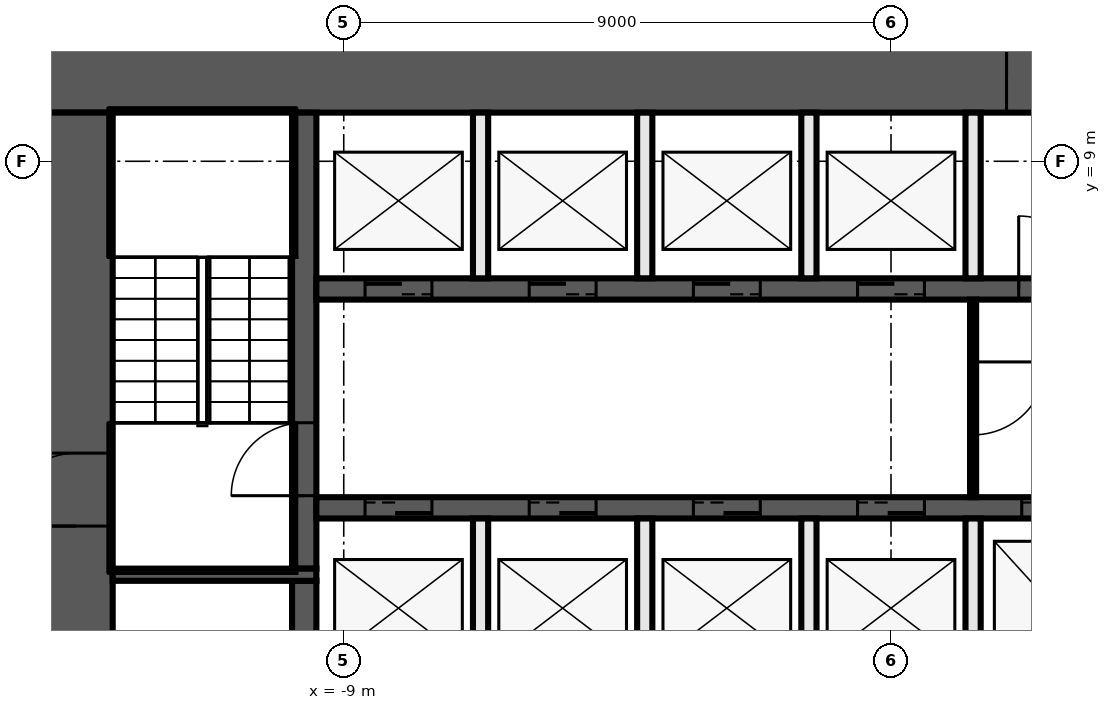
"""IFC4 building model, lengths in metres.
Left out: names, types, materials, properties, quantities, classifications, styles, units other than length and angle.
Written with IfcOpenShell. Run it as: python <this file> out.ifc"""

import sys

from ifc_helpers import new_model, si_unit, direction, frame, frame_2d, origin, place, context, subcontext, project, spatial, rectangle, extrude, element, fill, save


model = new_model("IFC4")
c1 = context("Model", 3, precision=1e-05, world=origin(), true_north=direction((0.0, 1.0)))
c2 = subcontext(c1, "Body", "Model", "MODEL_VIEW")
j1 = project(units=[si_unit("LENGTHUNIT", "METRE"), si_unit("PLANEANGLEUNIT", "RADIAN")], contexts=[c1])
p1 = place(None, origin())
s1 = spatial("IfcSite", under=j1, at=p1, CompositionType="ELEMENT")
p2 = place(p1, origin())
s2 = spatial("IfcBuilding", under=s1, at=p2, CompositionType="ELEMENT")
p3 = place(p2, origin())
s3 = spatial("IfcBuildingStorey", under=s2, at=p3, CompositionType="ELEMENT", Elevation=0.0)
p4 = place(p3, frame((-14.0, 10.4, 0.0), z_axis=(0.0, 0.0, 1.0), x_axis=(1.0, 0.0, 0.0)))
e1 = element("IfcWall", 1, at=p4, inside=s3, PredefinedType="SHEAR", context=c2, shape_type="SweptSolid", body=[
    extrude(rectangle(XDim=28.0, YDim=1.2, at=frame_2d((14.0, 0.0))), origin(), (0.0, 0.0, 1.0), 8.55),
])
p5 = place(p4, frame((15.9, 0.0, 0.0)))
e2 = element("IfcOpeningElement", 2, at=p5, cuts=e1, PredefinedType="OPENING", context=c2, shape_type="SweptSolid", body=[
    extrude(rectangle(XDim=1.6, YDim=2.1, at=frame_2d((0.8, 1.05))), frame((0.0, 0.61, 0.0), z_axis=(0.0, -1.0, 0.0), x_axis=(1.0, 0.0, 0.0)), (0.0, 0.0, 1.0), 1.22),
])
p6 = place(p3, frame((-13.4, -9.8, 0.0), z_axis=(0.0, 0.0, 1.0), x_axis=(0.0, 1.0, 0.0)))
e3 = element("IfcWall", 3, at=p6, inside=s3, PredefinedType="SHEAR", context=c2, shape_type="SweptSolid", body=[
    extrude(rectangle(XDim=19.6, YDim=1.2, at=frame_2d((9.8, 0.0))), origin(), (0.0, 0.0, 1.0), 8.55),
])
p7 = place(p6, frame((12.8, 0.0, 0.0)))
e4 = element("IfcOpeningElement", 4, at=p7, cuts=e3, PredefinedType="OPENING", context=c2, shape_type="SweptSolid", body=[
    extrude(rectangle(XDim=1.2, YDim=2.1, at=frame_2d((0.6, 1.05))), frame((0.0, 0.61, 0.0), z_axis=(0.0, -1.0, 0.0), x_axis=(1.0, 0.0, 0.0)), (0.0, 0.0, 1.0), 1.22),
])
p8 = place(p6, frame((5.6, 0.0, 0.0)))
e5 = element("IfcOpeningElement", 5, at=p8, cuts=e3, PredefinedType="OPENING", context=c2, shape_type="SweptSolid", body=[
    extrude(rectangle(XDim=1.2, YDim=2.1, at=frame_2d((0.6, 1.05))), frame((0.0, 0.61, 0.0), z_axis=(0.0, -1.0, 0.0), x_axis=(1.0, 0.0, 0.0)), (0.0, 0.0, 1.0), 1.22),
])
p9 = place(p3, frame((-9.65, -2.1, 0.0), z_axis=(0.0, 0.0, 1.0), x_axis=(0.0, 1.0, 0.0)))
e6 = element("IfcWall", 6, at=p9, inside=s3, PredefinedType="SHEAR", context=c2, shape_type="SweptSolid", body=[
    extrude(rectangle(XDim=4.2, YDim=0.4, at=frame_2d((2.1, 0.0))), origin(), (0.0, 0.0, 1.0), 8.55),
])
p10 = place(p3, frame((-9.65, 2.3, 0.0), z_axis=(0.0, 0.0, 1.0), x_axis=(0.0, 1.0, 0.0)))
e7 = element("IfcWall", 7, at=p10, inside=s3, PredefinedType="SHEAR", context=c2, shape_type="SweptSolid", body=[
    extrude(rectangle(XDim=7.5, YDim=0.4, at=frame_2d((3.75, 0.0))), origin(), (0.0, 0.0, 1.0), 8.55),
])
p11 = place(p10, frame((1.2, 0.0, 0.0)))
e8 = element("IfcOpeningElement", 8, at=p11, cuts=e7, PredefinedType="OPENING", context=c2, shape_type="SweptSolid", body=[
    extrude(rectangle(XDim=1.2, YDim=2.1, at=frame_2d((0.6, 1.05))), frame((0.0, 0.21, 0.0), z_axis=(0.0, -1.0, 0.0), x_axis=(1.0, 0.0, 0.0)), (0.0, 0.0, 1.0), 0.42),
])
p12 = place(p3, frame((-9.45, 2.2, 0.0), z_axis=(0.0, 0.0, 1.0), x_axis=(-1.0, 0.0, 0.0)))
e9 = element("IfcWall", 9, at=p12, inside=s3, PredefinedType="SHEAR", context=c2, shape_type="SweptSolid", body=[
    extrude(rectangle(XDim=3.35, YDim=0.2, at=frame_2d((1.675, 0.0))), origin(), (0.0, 0.0, 1.0), 8.55),
])
p13 = place(p3, frame((-9.45, 6.9, 0.0), z_axis=(0.0, 0.0, 1.0), x_axis=(1.0, 0.0, 0.0)))
e10 = element("IfcWall", 10, at=p13, inside=s3, PredefinedType="SHEAR", context=c2, shape_type="SweptSolid", body=[
    extrude(rectangle(XDim=18.9, YDim=0.35, at=frame_2d((9.45, 0.0))), origin(), (0.0, 0.0, 1.0), 8.55),
])
p14 = place(p13, frame((0.8, 0.0, 0.0)))
e11 = element("IfcOpeningElement", 11, at=p14, cuts=e10, PredefinedType="OPENING", context=c2, shape_type="SweptSolid", body=[
    extrude(rectangle(XDim=1.1, YDim=2.1, at=frame_2d((0.55, 1.05))), frame((0.0, 0.185, 0.0), z_axis=(0.0, -1.0, 0.0), x_axis=(1.0, 0.0, 0.0)), (0.0, 0.0, 1.0), 0.37),
])
p15 = place(p13, frame((3.5, 0.0, 0.0)))
e12 = element("IfcOpeningElement", 12, at=p15, cuts=e10, PredefinedType="OPENING", context=c2, shape_type="SweptSolid", body=[
    extrude(rectangle(XDim=1.1, YDim=2.1, at=frame_2d((0.55, 1.05))), frame((0.0, 0.185, 0.0), z_axis=(0.0, -1.0, 0.0), x_axis=(1.0, 0.0, 0.0)), (0.0, 0.0, 1.0), 0.37),
])
p16 = place(p13, frame((6.2, 0.0, 0.0)))
e13 = element("IfcOpeningElement", 13, at=p16, cuts=e10, PredefinedType="OPENING", context=c2, shape_type="SweptSolid", body=[
    extrude(rectangle(XDim=1.1, YDim=2.1, at=frame_2d((0.55, 1.05))), frame((0.0, 0.185, 0.0), z_axis=(0.0, -1.0, 0.0), x_axis=(1.0, 0.0, 0.0)), (0.0, 0.0, 1.0), 0.37),
])
p17 = place(p13, frame((8.9, 0.0, 0.0)))
e14 = element("IfcOpeningElement", 14, at=p17, cuts=e10, PredefinedType="OPENING", context=c2, shape_type="SweptSolid", body=[
    extrude(rectangle(XDim=1.1, YDim=2.1, at=frame_2d((0.55, 1.05))), frame((0.0, 0.185, 0.0), z_axis=(0.0, -1.0, 0.0), x_axis=(1.0, 0.0, 0.0)), (0.0, 0.0, 1.0), 0.37),
])
p18 = place(p13, frame((11.55, 0.0, 0.0)))
e15 = element("IfcOpeningElement", 15, at=p18, cuts=e10, PredefinedType="OPENING", context=c2, shape_type="SweptSolid", body=[
    extrude(rectangle(XDim=1.2, YDim=2.1, at=frame_2d((0.6, 1.05))), frame((0.0, 0.185, 0.0), z_axis=(0.0, -1.0, 0.0), x_axis=(1.0, 0.0, 0.0)), (0.0, 0.0, 1.0), 0.37),
])
p19 = place(p13, frame((14.3, 0.0, 0.0)))
e16 = element("IfcOpeningElement", 16, at=p19, cuts=e10, PredefinedType="OPENING", context=c2, shape_type="SweptSolid", body=[
    extrude(rectangle(XDim=1.1, YDim=2.1, at=frame_2d((0.55, 1.05))), frame((0.0, 0.185, 0.0), z_axis=(0.0, -1.0, 0.0), x_axis=(1.0, 0.0, 0.0)), (0.0, 0.0, 1.0), 0.37),
])
p20 = place(p13, frame((17.0, 0.0, 0.0)))
e17 = element("IfcOpeningElement", 17, at=p20, cuts=e10, PredefinedType="OPENING", context=c2, shape_type="SweptSolid", body=[
    extrude(rectangle(XDim=1.1, YDim=2.1, at=frame_2d((0.55, 1.05))), frame((0.0, 0.185, 0.0), z_axis=(0.0, -1.0, 0.0), x_axis=(1.0, 0.0, 0.0)), (0.0, 0.0, 1.0), 0.37),
])
p21 = place(p3, frame((9.45, 3.3, 0.0), z_axis=(0.0, 0.0, 1.0), x_axis=(-1.0, 0.0, 0.0)))
e18 = element("IfcWall", 18, at=p21, inside=s3, PredefinedType="SHEAR", context=c2, shape_type="SweptSolid", body=[
    extrude(rectangle(XDim=18.9, YDim=0.35, at=frame_2d((9.45, 0.0))), origin(), (0.0, 0.0, 1.0), 8.55),
])
p22 = place(p21, frame((0.9, 0.0, 0.0)))
e19 = element("IfcOpeningElement", 19, at=p22, cuts=e18, PredefinedType="OPENING", context=c2, shape_type="SweptSolid", body=[
    extrude(rectangle(XDim=0.9, YDim=2.1, at=frame_2d((0.45, 1.05))), frame((0.0, 0.185, 0.0), z_axis=(0.0, -1.0, 0.0), x_axis=(1.0, 0.0, 0.0)), (0.0, 0.0, 1.0), 0.37),
])
p23 = place(p21, frame((17.0, 0.0, 0.0)))
e20 = element("IfcOpeningElement", 20, at=p23, cuts=e18, PredefinedType="OPENING", context=c2, shape_type="SweptSolid", body=[
    extrude(rectangle(XDim=1.1, YDim=2.1, at=frame_2d((0.55, 1.05))), frame((0.0, 0.185, 0.0), z_axis=(0.0, -1.0, 0.0), x_axis=(1.0, 0.0, 0.0)), (0.0, 0.0, 1.0), 0.37),
])
p24 = place(p21, frame((14.3, 0.0, 0.0)))
e21 = element("IfcOpeningElement", 21, at=p24, cuts=e18, PredefinedType="OPENING", context=c2, shape_type="SweptSolid", body=[
    extrude(rectangle(XDim=1.1, YDim=2.1, at=frame_2d((0.55, 1.05))), frame((0.0, 0.185, 0.0), z_axis=(0.0, -1.0, 0.0), x_axis=(1.0, 0.0, 0.0)), (0.0, 0.0, 1.0), 0.37),
])
p25 = place(p21, frame((11.6, 0.0, 0.0)))
e22 = element("IfcOpeningElement", 22, at=p25, cuts=e18, PredefinedType="OPENING", context=c2, shape_type="SweptSolid", body=[
    extrude(rectangle(XDim=1.1, YDim=2.1, at=frame_2d((0.55, 1.05))), frame((0.0, 0.185, 0.0), z_axis=(0.0, -1.0, 0.0), x_axis=(1.0, 0.0, 0.0)), (0.0, 0.0, 1.0), 0.37),
])
p26 = place(p21, frame((8.9, 0.0, 0.0)))
e23 = element("IfcOpeningElement", 23, at=p26, cuts=e18, PredefinedType="OPENING", context=c2, shape_type="SweptSolid", body=[
    extrude(rectangle(XDim=1.1, YDim=2.1, at=frame_2d((0.55, 1.05))), frame((0.0, 0.185, 0.0), z_axis=(0.0, -1.0, 0.0), x_axis=(1.0, 0.0, 0.0)), (0.0, 0.0, 1.0), 0.37),
])
p27 = place(p21, frame((6.2, 0.0, 0.0)))
e24 = element("IfcOpeningElement", 24, at=p27, cuts=e18, PredefinedType="OPENING", context=c2, shape_type="SweptSolid", body=[
    extrude(rectangle(XDim=1.1, YDim=2.1, at=frame_2d((0.55, 1.05))), frame((0.0, 0.185, 0.0), z_axis=(0.0, -1.0, 0.0), x_axis=(1.0, 0.0, 0.0)), (0.0, 0.0, 1.0), 0.37),
])
p28 = place(p21, frame((3.5, 0.0, 0.0)))
e25 = element("IfcOpeningElement", 25, at=p28, cuts=e18, PredefinedType="OPENING", context=c2, shape_type="SweptSolid", body=[
    extrude(rectangle(XDim=1.1, YDim=2.1, at=frame_2d((0.55, 1.05))), frame((0.0, 0.185, 0.0), z_axis=(0.0, -1.0, 0.0), x_axis=(1.0, 0.0, 0.0)), (0.0, 0.0, 1.0), 0.37),
])
p29 = place(p3, frame((1.35, 6.725, 0.0), z_axis=(0.0, 0.0, 1.0), x_axis=(0.0, -1.0, 0.0)))
e26 = element("IfcWall", 26, at=p29, inside=s3, PredefinedType="PARTITIONING", context=c2, shape_type="SweptSolid", body=[
    extrude(rectangle(XDim=3.25, YDim=0.1, at=frame_2d((1.625, 0.0))), origin(), (0.0, 0.0, 1.0), 8.55),
])
p30 = place(p29, frame((1.025, 0.0, 0.0)))
e27 = element("IfcOpeningElement", 27, at=p30, cuts=e26, PredefinedType="OPENING", context=c2, shape_type="SweptSolid", body=[
    extrude(rectangle(XDim=1.2, YDim=2.1, at=frame_2d((0.6, 1.05))), frame((0.0, 0.06, 0.0), z_axis=(0.0, -1.0, 0.0), x_axis=(1.0, 0.0, 0.0)), (0.0, 0.0, 1.0), 0.12),
])
for number, where, z_axis, x_axis in (
    (28, (1.35, 0.4, 0.0), (0.0, 0.0, 1.0), (0.0, 1.0, 0.0)),
    (29, (1.35, 7.075, 0.0), (0.0, 0.0, 1.0), (0.0, 1.0, 0.0)),
    (30, (-1.35, 0.4, 0.0), (0.0, 0.0, 1.0), (0.0, 1.0, 0.0)),
    (31, (-1.35, 7.075, 0.0), (0.0, 0.0, 1.0), (0.0, 1.0, 0.0)),
    (32, (-4.05, 0.4, 0.0), (0.0, 0.0, 1.0), (0.0, 1.0, 0.0)),
    (33, (-4.05, 7.075, 0.0), (0.0, 0.0, 1.0), (0.0, 1.0, 0.0)),
    (34, (-6.75, 0.4, 0.0), (0.0, 0.0, 1.0), (0.0, 1.0, 0.0)),
    (35, (-6.75, 7.075, 0.0), (0.0, 0.0, 1.0), (0.0, 1.0, 0.0)),
):
    element("IfcWall", number, at=place(p3, frame(where, z_axis=z_axis, x_axis=x_axis)), inside=s3, PredefinedType="SOLIDWALL", context=c2, shape_type="SweptSolid", body=[
        extrude(rectangle(XDim=2.725, YDim=0.25, at=frame_2d((1.363, 0.0))), origin(), (0.0, 0.0, 1.0), 8.55),
    ])
p31 = place(p14, origin())
e36 = element("IfcDoor", 36, at=p31, inside=s3, OperationType="DOUBLE_DOOR_SLIDING", PredefinedType="DOOR", context=c2, shape_type="SweptSolid", body=[
    extrude(rectangle(XDim=1.1, YDim=2.1, at=frame_2d((0.55, 1.05))), frame((0.0, 0.025, 0.0), z_axis=(0.0, -1.0, 0.0), x_axis=(1.0, 0.0, 0.0)), (0.0, 0.0, 1.0), 0.05),
])
fill(e11, e36)
p32 = place(p15, origin())
e37 = element("IfcDoor", 37, at=p32, inside=s3, OperationType="DOUBLE_DOOR_SLIDING", PredefinedType="DOOR", context=c2, shape_type="SweptSolid", body=[
    extrude(rectangle(XDim=1.1, YDim=2.1, at=frame_2d((0.55, 1.05))), frame((0.0, 0.025, 0.0), z_axis=(0.0, -1.0, 0.0), x_axis=(1.0, 0.0, 0.0)), (0.0, 0.0, 1.0), 0.05),
])
fill(e12, e37)
p33 = place(p16, origin())
e38 = element("IfcDoor", 38, at=p33, inside=s3, OperationType="DOUBLE_DOOR_SLIDING", PredefinedType="DOOR", context=c2, shape_type="SweptSolid", body=[
    extrude(rectangle(XDim=1.1, YDim=2.1, at=frame_2d((0.55, 1.05))), frame((0.0, 0.025, 0.0), z_axis=(0.0, -1.0, 0.0), x_axis=(1.0, 0.0, 0.0)), (0.0, 0.0, 1.0), 0.05),
])
fill(e13, e38)
p34 = place(p17, origin())
e39 = element("IfcDoor", 39, at=p34, inside=s3, OperationType="DOUBLE_DOOR_SLIDING", PredefinedType="DOOR", context=c2, shape_type="SweptSolid", body=[
    extrude(rectangle(XDim=1.1, YDim=2.1, at=frame_2d((0.55, 1.05))), frame((0.0, 0.025, 0.0), z_axis=(0.0, -1.0, 0.0), x_axis=(1.0, 0.0, 0.0)), (0.0, 0.0, 1.0), 0.05),
])
fill(e14, e39)
p35 = place(p5, origin())
e40 = element("IfcDoor", 40, at=p35, inside=s3, OperationType="DOUBLE_DOOR_SINGLE_SWING", PredefinedType="DOOR", context=c2, shape_type="SweptSolid", body=[
    extrude(rectangle(XDim=1.6, YDim=2.1, at=frame_2d((0.8, 1.05))), frame((0.0, 0.025, 0.0), z_axis=(0.0, -1.0, 0.0), x_axis=(1.0, 0.0, 0.0)), (0.0, 0.0, 1.0), 0.05),
])
fill(e2, e40)
p36 = place(p18, origin())
e41 = element("IfcDoor", 41, at=p36, inside=s3, OperationType="SINGLE_SWING_LEFT", PredefinedType="DOOR", context=c2, shape_type="SweptSolid", body=[
    extrude(rectangle(XDim=1.2, YDim=2.1, at=frame_2d((0.6, 1.05))), frame((0.0, 0.025, 0.0), z_axis=(0.0, -1.0, 0.0), x_axis=(1.0, 0.0, 0.0)), (0.0, 0.0, 1.0), 0.05),
])
fill(e15, e41)
p37 = place(p23, origin())
e42 = element("IfcDoor", 42, at=p37, inside=s3, OperationType="DOUBLE_DOOR_SLIDING", PredefinedType="DOOR", context=c2, shape_type="SweptSolid", body=[
    extrude(rectangle(XDim=1.1, YDim=2.1, at=frame_2d((0.55, 1.05))), frame((0.0, 0.025, 0.0), z_axis=(0.0, -1.0, 0.0), x_axis=(1.0, 0.0, 0.0)), (0.0, 0.0, 1.0), 0.05),
])
fill(e20, e42)
p38 = place(p24, origin())
e43 = element("IfcDoor", 43, at=p38, inside=s3, OperationType="DOUBLE_DOOR_SLIDING", PredefinedType="DOOR", context=c2, shape_type="SweptSolid", body=[
    extrude(rectangle(XDim=1.1, YDim=2.1, at=frame_2d((0.55, 1.05))), frame((0.0, 0.025, 0.0), z_axis=(0.0, -1.0, 0.0), x_axis=(1.0, 0.0, 0.0)), (0.0, 0.0, 1.0), 0.05),
])
fill(e21, e43)
p39 = place(p25, origin())
e44 = element("IfcDoor", 44, at=p39, inside=s3, OperationType="DOUBLE_DOOR_SLIDING", PredefinedType="DOOR", context=c2, shape_type="SweptSolid", body=[
    extrude(rectangle(XDim=1.1, YDim=2.1, at=frame_2d((0.55, 1.05))), frame((0.0, 0.025, 0.0), z_axis=(0.0, -1.0, 0.0), x_axis=(1.0, 0.0, 0.0)), (0.0, 0.0, 1.0), 0.05),
])
fill(e22, e44)
p40 = place(p26, origin())
e45 = element("IfcDoor", 45, at=p40, inside=s3, OperationType="DOUBLE_DOOR_SLIDING", PredefinedType="DOOR", context=c2, shape_type="SweptSolid", body=[
    extrude(rectangle(XDim=1.1, YDim=2.1, at=frame_2d((0.55, 1.05))), frame((0.0, 0.025, 0.0), z_axis=(0.0, -1.0, 0.0), x_axis=(1.0, 0.0, 0.0)), (0.0, 0.0, 1.0), 0.05),
])
fill(e23, e45)
p41 = place(p27, origin())
e46 = element("IfcDoor", 46, at=p41, inside=s3, OperationType="DOUBLE_DOOR_SLIDING", PredefinedType="DOOR", context=c2, shape_type="SweptSolid", body=[
    extrude(rectangle(XDim=1.1, YDim=2.1, at=frame_2d((0.55, 1.05))), frame((0.0, 0.025, 0.0), z_axis=(0.0, -1.0, 0.0), x_axis=(1.0, 0.0, 0.0)), (0.0, 0.0, 1.0), 0.05),
])
fill(e24, e46)
p42 = place(p11, origin())
e47 = element("IfcDoor", 47, at=p42, inside=s3, OperationType="SINGLE_SWING_RIGHT", PredefinedType="DOOR", context=c2, shape_type="SweptSolid", body=[
    extrude(rectangle(XDim=1.2, YDim=2.1, at=frame_2d((0.6, 1.05))), frame((0.0, 0.025, 0.0), z_axis=(0.0, -1.0, 0.0), x_axis=(1.0, 0.0, 0.0)), (0.0, 0.0, 1.0), 0.05),
])
fill(e8, e47)
p43 = place(p30, origin())
e48 = element("IfcDoor", 48, at=p43, inside=s3, OperationType="SINGLE_SWING_LEFT", PredefinedType="DOOR", context=c2, shape_type="SweptSolid", body=[
    extrude(rectangle(XDim=1.2, YDim=2.1, at=frame_2d((0.6, 1.05))), frame((0.0, 0.025, 0.0), z_axis=(0.0, -1.0, 0.0), x_axis=(1.0, 0.0, 0.0)), (0.0, 0.0, 1.0), 0.05),
])
fill(e27, e48)
p44 = place(p7, origin())
e49 = element("IfcDoor", 49, at=p44, inside=s3, OperationType="SINGLE_SWING_LEFT", PredefinedType="DOOR", context=c2, shape_type="SweptSolid", body=[
    extrude(rectangle(XDim=1.2, YDim=2.1, at=frame_2d((0.6, 1.05))), frame((0.0, 0.025, 0.0), z_axis=(0.0, -1.0, 0.0), x_axis=(1.0, 0.0, 0.0)), (0.0, 0.0, 1.0), 0.05),
])
fill(e4, e49)
save(model, sys.argv[1])
